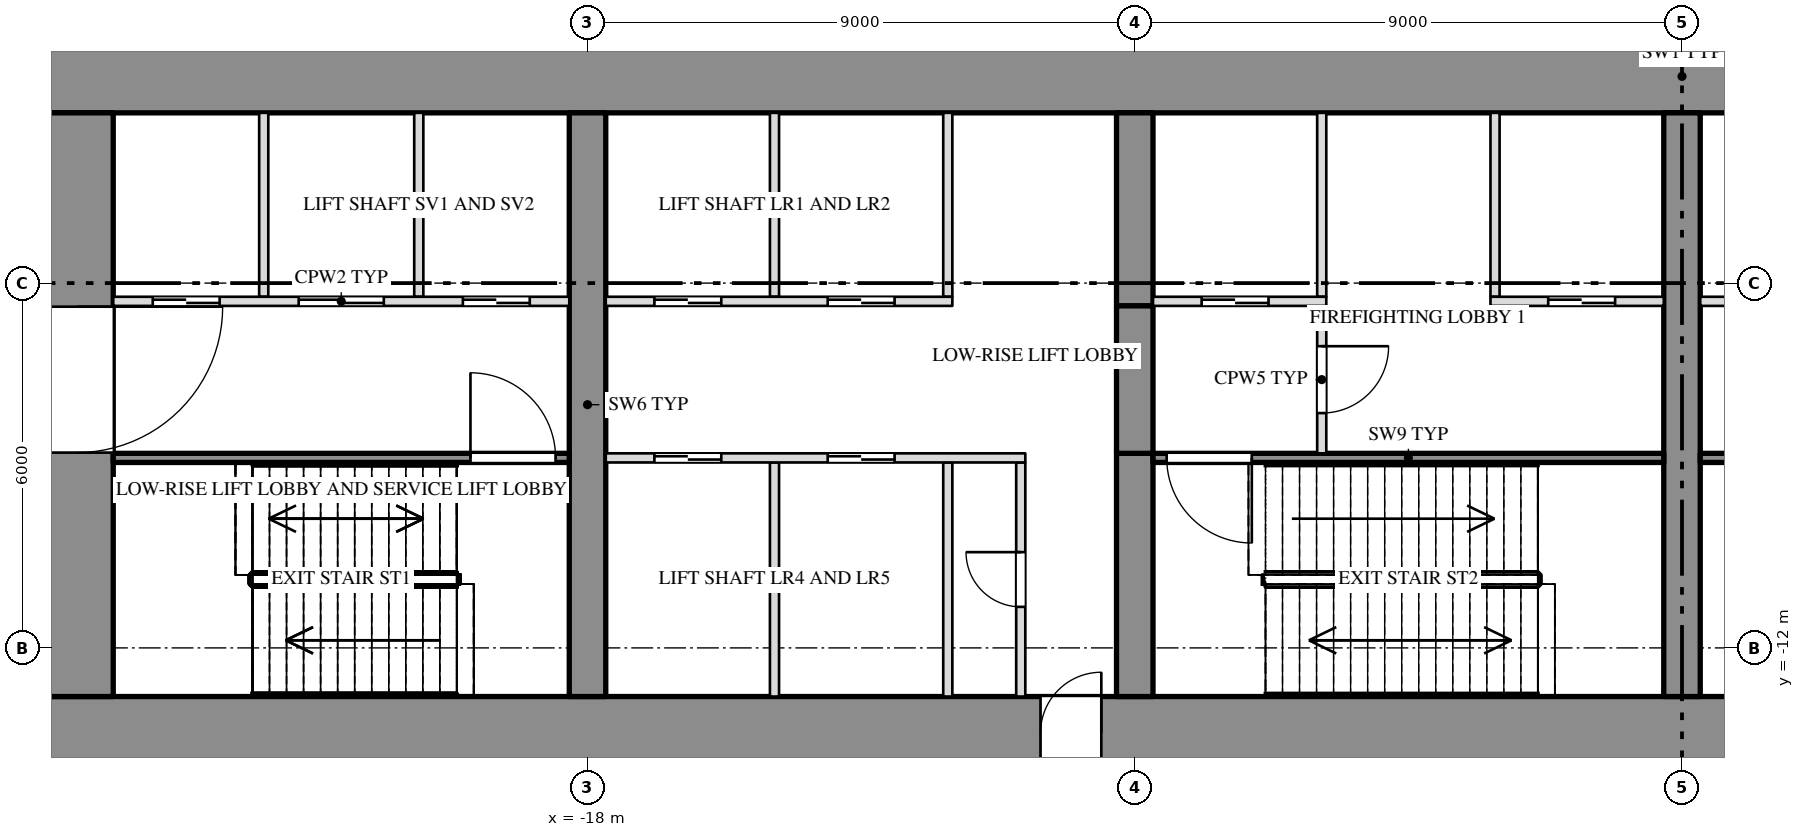
"""IFC4 building model, lengths in metres.
Left out: names, types, materials, properties, quantities, classifications, styles, units other than length and angle.
Written with IfcOpenShell. Run it as: python <this file> out.ifc"""

import sys

from ifc_helpers import new_model, si_unit, direction, frame, frame_2d, origin, place, context, subcontext, project, spatial, rectangle, extrude, element, fill, save


model = new_model("IFC4")
c1 = context("Model", 3, precision=1e-05, world=origin(), true_north=direction((0.0, 1.0)))
c2 = subcontext(c1, "Body", "Model", "MODEL_VIEW")
j1 = project(units=[si_unit("LENGTHUNIT", "METRE"), si_unit("PLANEANGLEUNIT", "RADIAN")], contexts=[c1])
p1 = place(None, origin())
s1 = spatial("IfcSite", under=j1, at=p1, CompositionType="ELEMENT")
p2 = place(p1, origin())
s2 = spatial("IfcBuilding", under=s1, at=p2, CompositionType="ELEMENT")
p3 = place(p2, frame((0.0, 0.0, 33.0)))
s3 = spatial("IfcBuildingStorey", under=s2, at=p3, CompositionType="ELEMENT", Elevation=33.0)
p4 = place(p3, frame((-27.0, -2.6, 0.0), z_axis=(0.0, 0.0, 1.0), x_axis=(1.0, 0.0, 0.0)))
e1 = element("IfcWall", 1, at=p4, inside=s3, PredefinedType="SHEAR", context=c2, shape_type="SweptSolid", body=[
    extrude(rectangle(XDim=54.0, YDim=1.2, at=frame_2d((27.0, 0.0))), origin(), (0.0, 0.0, 1.0), 5.75),
])
p5 = place(p3, frame((-27.0, -13.4, 0.0), z_axis=(0.0, 0.0, 1.0), x_axis=(1.0, 0.0, 0.0)))
e2 = element("IfcWall", 2, at=p5, inside=s3, PredefinedType="SHEAR", context=c2, shape_type="SweptSolid", body=[
    extrude(rectangle(XDim=54.0, YDim=1.2, at=frame_2d((27.0, 0.0))), origin(), (0.0, 0.0, 1.0), 5.75),
])
p6 = place(p5, frame((16.45, 0.0, 0.0)))
e3 = element("IfcOpeningElement", 3, at=p6, cuts=e2, PredefinedType="OPENING", context=c2, shape_type="SweptSolid", body=[
    extrude(rectangle(XDim=1.0, YDim=2.1, at=frame_2d((0.5, 1.05))), frame((0.0, 0.612, 0.0), z_axis=(0.0, -1.0, 0.0), x_axis=(1.0, 0.0, 0.0)), (0.0, 0.0, 1.0), 1.224),
])
p7 = place(p5, frame((36.55, 0.0, 0.0)))
e4 = element("IfcOpeningElement", 4, at=p7, cuts=e2, PredefinedType="OPENING", context=c2, shape_type="SweptSolid", body=[
    extrude(rectangle(XDim=1.0, YDim=2.1, at=frame_2d((0.5, 1.05))), frame((0.0, 0.612, 0.0), z_axis=(0.0, -1.0, 0.0), x_axis=(1.0, 0.0, 0.0)), (0.0, 0.0, 1.0), 1.224),
])
p8 = place(p3, frame((-26.4, -12.8, 0.0), z_axis=(0.0, 0.0, 1.0), x_axis=(0.0, 1.0, 0.0)))
e5 = element("IfcWall", 5, at=p8, inside=s3, PredefinedType="SHEAR", context=c2, shape_type="SweptSolid", body=[
    extrude(rectangle(XDim=9.6, YDim=1.2, at=frame_2d((4.8, 0.0))), origin(), (0.0, 0.0, 1.0), 5.75),
])
p9 = place(p8, frame((4.012, 0.0, 0.0)))
e6 = element("IfcOpeningElement", 6, at=p9, cuts=e5, PredefinedType="OPENING", context=c2, shape_type="SweptSolid", body=[
    extrude(rectangle(XDim=2.4, YDim=2.1, at=frame_2d((1.2, 1.05))), frame((0.0, 0.612, 0.0), z_axis=(0.0, -1.0, 0.0), x_axis=(1.0, 0.0, 0.0)), (0.0, 0.0, 1.0), 1.224),
])
p10 = place(p3, frame((-18.0, -12.8, 0.0), z_axis=(0.0, 0.0, 1.0), x_axis=(0.0, 1.0, 0.0)))
e7 = element("IfcWall", 7, at=p10, inside=s3, PredefinedType="SHEAR", context=c2, shape_type="SweptSolid", body=[
    extrude(rectangle(XDim=9.6, YDim=0.6, at=frame_2d((4.8, 0.0))), origin(), (0.0, 0.0, 1.0), 5.75),
])
p11 = place(p3, frame((-9.0, -12.8, 0.0), z_axis=(0.0, 0.0, 1.0), x_axis=(0.0, 1.0, 0.0)))
e8 = element("IfcWall", 8, at=p11, inside=s3, PredefinedType="SHEAR", context=c2, shape_type="SweptSolid", body=[
    extrude(rectangle(XDim=4.0, YDim=0.6, at=frame_2d((2.0, 0.0))), origin(), (0.0, 0.0, 1.0), 5.75),
])
p12 = place(p3, frame((-9.0, -6.375, 0.0), z_axis=(0.0, 0.0, 1.0), x_axis=(0.0, 1.0, 0.0)))
e9 = element("IfcWall", 9, at=p12, inside=s3, PredefinedType="SHEAR", context=c2, shape_type="SweptSolid", body=[
    extrude(rectangle(XDim=3.175, YDim=0.6, at=frame_2d((1.587, 0.0))), origin(), (0.0, 0.0, 1.0), 5.75),
])
p13 = place(p3, frame((-9.0, -8.8, 3.6), z_axis=(0.0, 0.0, 1.0), x_axis=(0.0, 1.0, 0.0)))
e10 = element("IfcWall", 10, at=p13, inside=s3, PredefinedType="SHEAR", context=c2, shape_type="SweptSolid", body=[
    extrude(rectangle(XDim=2.425, YDim=0.6, at=frame_2d((1.212, 0.0))), origin(), (0.0, 0.0, 1.0), 2.15),
])
p14 = place(p3, frame((0.0, -12.8, 0.0), z_axis=(0.0, 0.0, 1.0), x_axis=(0.0, 1.0, 0.0)))
e11 = element("IfcWall", 11, at=p14, inside=s3, PredefinedType="SHEAR", context=c2, shape_type="SweptSolid", body=[
    extrude(rectangle(XDim=9.6, YDim=0.6, at=frame_2d((4.8, 0.0))), origin(), (0.0, 0.0, 1.0), 5.75),
])
for number, where, z_axis, x_axis in (
    (12, (-20.775, -6.225, 0.0), (0.0, 0.0, 1.0), (0.0, 1.0, 0.0)),
    (13, (-23.325, -6.225, 0.0), (0.0, 0.0, 1.0), (0.0, 1.0, 0.0)),
    (14, (-12.075, -6.225, 0.0), (0.0, 0.0, 1.0), (0.0, 1.0, 0.0)),
    (15, (-14.925, -6.225, 0.0), (0.0, 0.0, 1.0), (0.0, 1.0, 0.0)),
    (16, (-3.075, -6.225, 0.0), (0.0, 0.0, 1.0), (0.0, 1.0, 0.0)),
    (17, (-5.925, -6.225, 0.0), (0.0, 0.0, 1.0), (0.0, 1.0, 0.0)),
):
    element("IfcWall", number, at=place(p3, frame(where, z_axis=z_axis, x_axis=x_axis)), inside=s3, PredefinedType="PARTITIONING", context=c2, shape_type="SweptSolid", body=[
        extrude(rectangle(XDim=3.025, YDim=0.15, at=frame_2d((1.513, 0.0))), origin(), (0.0, 0.0, 1.0), 5.75),
    ])
p15 = place(p3, frame((-10.875, -12.8, 0.0), z_axis=(0.0, 0.0, 1.0), x_axis=(0.0, 1.0, 0.0)))
e18 = element("IfcWall", 18, at=p15, inside=s3, PredefinedType="PARTITIONING", context=c2, shape_type="SweptSolid", body=[
    extrude(rectangle(XDim=3.85, YDim=0.15, at=frame_2d((1.925, 0.0))), origin(), (0.0, 0.0, 1.0), 5.75),
])
p16 = place(p15, frame((1.475, 0.0, 0.0)))
e19 = element("IfcOpeningElement", 19, at=p16, cuts=e18, PredefinedType="OPENING", context=c2, shape_type="SweptSolid", body=[
    extrude(rectangle(XDim=0.9, YDim=2.1, at=frame_2d((0.45, 1.05))), frame((0.0, 0.087, 0.0), z_axis=(0.0, -1.0, 0.0), x_axis=(1.0, 0.0, 0.0)), (0.0, 0.0, 1.0), 0.174),
])
for number, where, z_axis, x_axis in (
    (20, (-12.075, -12.8, 0.0), (0.0, 0.0, 1.0), (0.0, 1.0, 0.0)),
    (21, (-14.925, -12.8, 0.0), (0.0, 0.0, 1.0), (0.0, 1.0, 0.0)),
):
    element("IfcWall", number, at=place(p3, frame(where, z_axis=z_axis, x_axis=x_axis)), inside=s3, PredefinedType="PARTITIONING", context=c2, shape_type="SweptSolid", body=[
        extrude(rectangle(XDim=3.85, YDim=0.15, at=frame_2d((1.925, 0.0))), origin(), (0.0, 0.0, 1.0), 5.75),
    ])
p17 = place(p3, frame((-5.925, -8.8, 0.0), z_axis=(0.0, 0.0, 1.0), x_axis=(0.0, 1.0, 0.0)))
e22 = element("IfcWall", 22, at=p17, inside=s3, PredefinedType="PARTITIONING", context=c2, shape_type="SweptSolid", body=[
    extrude(rectangle(XDim=2.425, YDim=0.15, at=frame_2d((1.212, 0.0))), origin(), (0.0, 0.0, 1.0), 5.75),
])
p18 = place(p17, frame((0.662, 0.0, 0.0)))
e23 = element("IfcOpeningElement", 23, at=p18, cuts=e22, PredefinedType="OPENING", context=c2, shape_type="SweptSolid", body=[
    extrude(rectangle(XDim=1.1, YDim=2.1, at=frame_2d((0.55, 1.05))), frame((0.0, 0.087, 0.0), z_axis=(0.0, -1.0, 0.0), x_axis=(1.0, 0.0, 0.0)), (0.0, 0.0, 1.0), 0.174),
])
p19 = place(p3, frame((-25.8, -6.3, 0.0), z_axis=(0.0, 0.0, 1.0), x_axis=(1.0, 0.0, 0.0)))
e24 = element("IfcWall", 24, at=p19, inside=s3, PredefinedType="PARTITIONING", context=c2, shape_type="SweptSolid", body=[
    extrude(rectangle(XDim=7.5, YDim=0.15, at=frame_2d((3.75, 0.0))), origin(), (0.0, 0.0, 1.0), 5.75),
])
p20 = place(p19, frame((0.65, 0.0, 0.0)))
e25 = element("IfcOpeningElement", 25, at=p20, cuts=e24, PredefinedType="OPENING", context=c2, shape_type="SweptSolid", body=[
    extrude(rectangle(XDim=1.1, YDim=2.1, at=frame_2d((0.55, 1.05))), frame((0.0, 0.087, 0.0), z_axis=(0.0, -1.0, 0.0), x_axis=(1.0, 0.0, 0.0)), (0.0, 0.0, 1.0), 0.174),
])
p21 = place(p19, frame((3.05, 0.0, 0.0)))
e26 = element("IfcOpeningElement", 26, at=p21, cuts=e24, PredefinedType="OPENING", context=c2, shape_type="SweptSolid", body=[
    extrude(rectangle(XDim=1.4, YDim=2.1, at=frame_2d((0.7, 1.05))), frame((0.0, 0.087, 0.0), z_axis=(0.0, -1.0, 0.0), x_axis=(1.0, 0.0, 0.0)), (0.0, 0.0, 1.0), 0.174),
])
p22 = place(p19, frame((5.75, 0.0, 0.0)))
e27 = element("IfcOpeningElement", 27, at=p22, cuts=e24, PredefinedType="OPENING", context=c2, shape_type="SweptSolid", body=[
    extrude(rectangle(XDim=1.1, YDim=2.1, at=frame_2d((0.55, 1.05))), frame((0.0, 0.087, 0.0), z_axis=(0.0, -1.0, 0.0), x_axis=(1.0, 0.0, 0.0)), (0.0, 0.0, 1.0), 0.174),
])
p23 = place(p3, frame((-17.7, -6.3, 0.0), z_axis=(0.0, 0.0, 1.0), x_axis=(1.0, 0.0, 0.0)))
e28 = element("IfcWall", 28, at=p23, inside=s3, PredefinedType="PARTITIONING", context=c2, shape_type="SweptSolid", body=[
    extrude(rectangle(XDim=5.7, YDim=0.15, at=frame_2d((2.85, 0.0))), origin(), (0.0, 0.0, 1.0), 5.75),
])
p24 = place(p23, frame((0.8, 0.0, 0.0)))
e29 = element("IfcOpeningElement", 29, at=p24, cuts=e28, PredefinedType="OPENING", context=c2, shape_type="SweptSolid", body=[
    extrude(rectangle(XDim=1.1, YDim=2.1, at=frame_2d((0.55, 1.05))), frame((0.0, 0.087, 0.0), z_axis=(0.0, -1.0, 0.0), x_axis=(1.0, 0.0, 0.0)), (0.0, 0.0, 1.0), 0.174),
])
p25 = place(p23, frame((3.65, 0.0, 0.0)))
e30 = element("IfcOpeningElement", 30, at=p25, cuts=e28, PredefinedType="OPENING", context=c2, shape_type="SweptSolid", body=[
    extrude(rectangle(XDim=1.1, YDim=2.1, at=frame_2d((0.55, 1.05))), frame((0.0, 0.087, 0.0), z_axis=(0.0, -1.0, 0.0), x_axis=(1.0, 0.0, 0.0)), (0.0, 0.0, 1.0), 0.174),
])
p26 = place(p3, frame((-8.7, -6.3, 0.0), z_axis=(0.0, 0.0, 1.0), x_axis=(1.0, 0.0, 0.0)))
e31 = element("IfcWall", 31, at=p26, inside=s3, PredefinedType="PARTITIONING", context=c2, shape_type="SweptSolid", body=[
    extrude(rectangle(XDim=2.85, YDim=0.15, at=frame_2d((1.425, 0.0))), origin(), (0.0, 0.0, 1.0), 5.75),
])
p27 = place(p26, frame((0.8, 0.0, 0.0)))
e32 = element("IfcOpeningElement", 32, at=p27, cuts=e31, PredefinedType="OPENING", context=c2, shape_type="SweptSolid", body=[
    extrude(rectangle(XDim=1.1, YDim=2.1, at=frame_2d((0.55, 1.05))), frame((0.0, 0.087, 0.0), z_axis=(0.0, -1.0, 0.0), x_axis=(1.0, 0.0, 0.0)), (0.0, 0.0, 1.0), 0.174),
])
p28 = place(p3, frame((-3.15, -6.3, 0.0), z_axis=(0.0, 0.0, 1.0), x_axis=(1.0, 0.0, 0.0)))
e33 = element("IfcWall", 33, at=p28, inside=s3, PredefinedType="PARTITIONING", context=c2, shape_type="SweptSolid", body=[
    extrude(rectangle(XDim=2.85, YDim=0.15, at=frame_2d((1.425, 0.0))), origin(), (0.0, 0.0, 1.0), 5.75),
])
p29 = place(p28, frame((0.95, 0.0, 0.0)))
e34 = element("IfcOpeningElement", 34, at=p29, cuts=e33, PredefinedType="OPENING", context=c2, shape_type="SweptSolid", body=[
    extrude(rectangle(XDim=1.1, YDim=2.1, at=frame_2d((0.55, 1.05))), frame((0.0, 0.087, 0.0), z_axis=(0.0, -1.0, 0.0), x_axis=(1.0, 0.0, 0.0)), (0.0, 0.0, 1.0), 0.174),
])
p30 = place(p3, frame((0.3, -6.3, 0.0), z_axis=(0.0, 0.0, 1.0), x_axis=(1.0, 0.0, 0.0)))
e35 = element("IfcWall", 35, at=p30, inside=s3, PredefinedType="PARTITIONING", context=c2, shape_type="SweptSolid", body=[
    extrude(rectangle(XDim=2.85, YDim=0.15, at=frame_2d((1.425, 0.0))), origin(), (0.0, 0.0, 1.0), 5.75),
])
p31 = place(p30, frame((0.8, 0.0, 0.0)))
e36 = element("IfcOpeningElement", 36, at=p31, cuts=e35, PredefinedType="OPENING", context=c2, shape_type="SweptSolid", body=[
    extrude(rectangle(XDim=1.1, YDim=2.1, at=frame_2d((0.55, 1.05))), frame((0.0, 0.087, 0.0), z_axis=(0.0, -1.0, 0.0), x_axis=(1.0, 0.0, 0.0)), (0.0, 0.0, 1.0), 0.174),
])
p32 = place(p3, frame((-25.8, -8.875, 0.0), z_axis=(0.0, 0.0, 1.0), x_axis=(1.0, 0.0, 0.0)))
e37 = element("IfcWall", 37, at=p32, inside=s3, PredefinedType="SHEAR", context=c2, shape_type="SweptSolid", body=[
    extrude(rectangle(XDim=7.5, YDim=0.15, at=frame_2d((3.75, 0.0))), origin(), (0.0, 0.0, 1.0), 5.75),
])
p33 = place(p32, frame((5.875, 0.0, 0.0)))
e38 = element("IfcOpeningElement", 38, at=p33, cuts=e37, PredefinedType="OPENING", context=c2, shape_type="SweptSolid", body=[
    extrude(rectangle(XDim=1.4, YDim=2.1, at=frame_2d((0.7, 1.05))), frame((0.0, 0.087, 0.0), z_axis=(0.0, -1.0, 0.0), x_axis=(1.0, 0.0, 0.0)), (0.0, 0.0, 1.0), 0.174),
])
p34 = place(p3, frame((-17.7, -8.875, 0.0), z_axis=(0.0, 0.0, 1.0), x_axis=(1.0, 0.0, 0.0)))
e39 = element("IfcWall", 39, at=p34, inside=s3, PredefinedType="PARTITIONING", context=c2, shape_type="SweptSolid", body=[
    extrude(rectangle(XDim=6.9, YDim=0.15, at=frame_2d((3.45, 0.0))), origin(), (0.0, 0.0, 1.0), 5.75),
])
p35 = place(p34, frame((0.8, 0.0, 0.0)))
e40 = element("IfcOpeningElement", 40, at=p35, cuts=e39, PredefinedType="OPENING", context=c2, shape_type="SweptSolid", body=[
    extrude(rectangle(XDim=1.1, YDim=2.1, at=frame_2d((0.55, 1.05))), frame((0.0, 0.087, 0.0), z_axis=(0.0, -1.0, 0.0), x_axis=(1.0, 0.0, 0.0)), (0.0, 0.0, 1.0), 0.174),
])
p36 = place(p34, frame((3.65, 0.0, 0.0)))
e41 = element("IfcOpeningElement", 41, at=p36, cuts=e39, PredefinedType="OPENING", context=c2, shape_type="SweptSolid", body=[
    extrude(rectangle(XDim=1.1, YDim=2.1, at=frame_2d((0.55, 1.05))), frame((0.0, 0.087, 0.0), z_axis=(0.0, -1.0, 0.0), x_axis=(1.0, 0.0, 0.0)), (0.0, 0.0, 1.0), 0.174),
])
p37 = place(p3, frame((-8.7, -8.875, 0.0), z_axis=(0.0, 0.0, 1.0), x_axis=(1.0, 0.0, 0.0)))
e42 = element("IfcWall", 42, at=p37, inside=s3, PredefinedType="SHEAR", context=c2, shape_type="SweptSolid", body=[
    extrude(rectangle(XDim=8.4, YDim=0.15, at=frame_2d((4.2, 0.0))), origin(), (0.0, 0.0, 1.0), 5.75),
])
p38 = place(p37, frame((0.225, 0.0, 0.0)))
e43 = element("IfcOpeningElement", 43, at=p38, cuts=e42, PredefinedType="OPENING", context=c2, shape_type="SweptSolid", body=[
    extrude(rectangle(XDim=1.4, YDim=2.1, at=frame_2d((0.7, 1.05))), frame((0.0, 0.087, 0.0), z_axis=(0.0, -1.0, 0.0), x_axis=(1.0, 0.0, 0.0)), (0.0, 0.0, 1.0), 0.174),
])
p39 = place(p3, frame((0.3, -8.875, 0.0), z_axis=(0.0, 0.0, 1.0), x_axis=(1.0, 0.0, 0.0)))
e44 = element("IfcWall", 44, at=p39, inside=s3, PredefinedType="SHEAR", context=c2, shape_type="SweptSolid", body=[
    extrude(rectangle(XDim=8.4, YDim=0.15, at=frame_2d((4.2, 0.0))), origin(), (0.0, 0.0, 1.0), 5.75),
])
p40 = place(p39, frame((6.775, 0.0, 0.0)))
e45 = element("IfcOpeningElement", 45, at=p40, cuts=e44, PredefinedType="OPENING", context=c2, shape_type="SweptSolid", body=[
    extrude(rectangle(XDim=1.4, YDim=2.1, at=frame_2d((0.7, 1.05))), frame((0.0, 0.087, 0.0), z_axis=(0.0, -1.0, 0.0), x_axis=(1.0, 0.0, 0.0)), (0.0, 0.0, 1.0), 0.174),
])
p41 = place(p9, origin())
e46 = element("IfcDoor", 46, at=p41, inside=s3, OperationType="DOUBLE_DOOR_SINGLE_SWING", PredefinedType="DOOR", context=c2, shape_type="SweptSolid", body=[
    extrude(rectangle(XDim=2.4, YDim=2.1, at=frame_2d((1.2, 1.05))), frame((0.0, 0.025, 0.0), z_axis=(0.0, -1.0, 0.0), x_axis=(1.0, 0.0, 0.0)), (0.0, 0.0, 1.0), 0.05),
])
fill(e6, e46)
p42 = place(p20, origin())
e47 = element("IfcDoor", 47, at=p42, inside=s3, OperationType="SLIDING_TO_RIGHT", PredefinedType="DOOR", context=c2, shape_type="SweptSolid", body=[
    extrude(rectangle(XDim=1.1, YDim=2.1, at=frame_2d((0.55, 1.05))), frame((0.0, 0.025, 0.0), z_axis=(0.0, -1.0, 0.0), x_axis=(1.0, 0.0, 0.0)), (0.0, 0.0, 1.0), 0.05),
])
fill(e25, e47)
p43 = place(p21, origin())
e48 = element("IfcDoor", 48, at=p43, inside=s3, OperationType="SLIDING_TO_LEFT", PredefinedType="DOOR", context=c2, shape_type="SweptSolid", body=[
    extrude(rectangle(XDim=1.4, YDim=2.1, at=frame_2d((0.7, 1.05))), frame((0.0, 0.025, 0.0), z_axis=(0.0, -1.0, 0.0), x_axis=(1.0, 0.0, 0.0)), (0.0, 0.0, 1.0), 0.05),
])
fill(e26, e48)
p44 = place(p22, origin())
e49 = element("IfcDoor", 49, at=p44, inside=s3, OperationType="SLIDING_TO_RIGHT", PredefinedType="DOOR", context=c2, shape_type="SweptSolid", body=[
    extrude(rectangle(XDim=1.1, YDim=2.1, at=frame_2d((0.55, 1.05))), frame((0.0, 0.025, 0.0), z_axis=(0.0, -1.0, 0.0), x_axis=(1.0, 0.0, 0.0)), (0.0, 0.0, 1.0), 0.05),
])
fill(e27, e49)
p45 = place(p33, origin())
e50 = element("IfcDoor", 50, at=p45, inside=s3, OperationType="DOUBLE_DOOR_SINGLE_SWING", PredefinedType="DOOR", context=c2, shape_type="SweptSolid", body=[
    extrude(rectangle(XDim=1.4, YDim=2.1, at=frame_2d((0.7, 1.05))), frame((0.0, 0.025, 0.0), z_axis=(0.0, -1.0, 0.0), x_axis=(1.0, 0.0, 0.0)), (0.0, 0.0, 1.0), 0.05),
])
fill(e38, e50)
p46 = place(p35, origin())
e51 = element("IfcDoor", 51, at=p46, inside=s3, OperationType="SLIDING_TO_RIGHT", PredefinedType="DOOR", context=c2, shape_type="SweptSolid", body=[
    extrude(rectangle(XDim=1.1, YDim=2.1, at=frame_2d((0.55, 1.05))), frame((0.0, 0.025, 0.0), z_axis=(0.0, -1.0, 0.0), x_axis=(1.0, 0.0, 0.0)), (0.0, 0.0, 1.0), 0.05),
])
fill(e40, e51)
p47 = place(p24, origin())
e52 = element("IfcDoor", 52, at=p47, inside=s3, OperationType="SLIDING_TO_LEFT", PredefinedType="DOOR", context=c2, shape_type="SweptSolid", body=[
    extrude(rectangle(XDim=1.1, YDim=2.1, at=frame_2d((0.55, 1.05))), frame((0.0, 0.025, 0.0), z_axis=(0.0, -1.0, 0.0), x_axis=(1.0, 0.0, 0.0)), (0.0, 0.0, 1.0), 0.05),
])
fill(e29, e52)
p48 = place(p36, origin())
e53 = element("IfcDoor", 53, at=p48, inside=s3, OperationType="SLIDING_TO_RIGHT", PredefinedType="DOOR", context=c2, shape_type="SweptSolid", body=[
    extrude(rectangle(XDim=1.1, YDim=2.1, at=frame_2d((0.55, 1.05))), frame((0.0, 0.025, 0.0), z_axis=(0.0, -1.0, 0.0), x_axis=(1.0, 0.0, 0.0)), (0.0, 0.0, 1.0), 0.05),
])
fill(e41, e53)
p49 = place(p25, origin())
e54 = element("IfcDoor", 54, at=p49, inside=s3, OperationType="SLIDING_TO_LEFT", PredefinedType="DOOR", context=c2, shape_type="SweptSolid", body=[
    extrude(rectangle(XDim=1.1, YDim=2.1, at=frame_2d((0.55, 1.05))), frame((0.0, 0.025, 0.0), z_axis=(0.0, -1.0, 0.0), x_axis=(1.0, 0.0, 0.0)), (0.0, 0.0, 1.0), 0.05),
])
fill(e30, e54)
p50 = place(p16, origin())
e55 = element("IfcDoor", 55, at=p50, inside=s3, OperationType="SINGLE_SWING_RIGHT", PredefinedType="DOOR", context=c2, shape_type="SweptSolid", body=[
    extrude(rectangle(XDim=0.9, YDim=2.1, at=frame_2d((0.45, 1.05))), frame((0.0, 0.025, 0.0), z_axis=(0.0, -1.0, 0.0), x_axis=(1.0, 0.0, 0.0)), (0.0, 0.0, 1.0), 0.05),
])
fill(e19, e55)
p51 = place(p6, origin())
e56 = element("IfcDoor", 56, at=p51, inside=s3, OperationType="SINGLE_SWING_RIGHT", PredefinedType="DOOR", context=c2, shape_type="SweptSolid", body=[
    extrude(rectangle(XDim=1.0, YDim=2.1, at=frame_2d((0.5, 1.05))), frame((0.0, 0.025, 0.0), z_axis=(0.0, -1.0, 0.0), x_axis=(1.0, 0.0, 0.0)), (0.0, 0.0, 1.0), 0.05),
])
fill(e3, e56)
p52 = place(p38, origin())
e57 = element("IfcDoor", 57, at=p52, inside=s3, OperationType="DOUBLE_DOOR_SINGLE_SWING", PredefinedType="DOOR", context=c2, shape_type="SweptSolid", body=[
    extrude(rectangle(XDim=1.4, YDim=2.1, at=frame_2d((0.7, 1.05))), frame((0.0, 0.025, 0.0), z_axis=(0.0, -1.0, 0.0), x_axis=(1.0, 0.0, 0.0)), (0.0, 0.0, 1.0), 0.05),
])
fill(e43, e57)
p53 = place(p27, origin())
e58 = element("IfcDoor", 58, at=p53, inside=s3, OperationType="SLIDING_TO_LEFT", PredefinedType="DOOR", context=c2, shape_type="SweptSolid", body=[
    extrude(rectangle(XDim=1.1, YDim=2.1, at=frame_2d((0.55, 1.05))), frame((0.0, 0.025, 0.0), z_axis=(0.0, -1.0, 0.0), x_axis=(1.0, 0.0, 0.0)), (0.0, 0.0, 1.0), 0.05),
])
fill(e32, e58)
p54 = place(p18, origin())
e59 = element("IfcDoor", 59, at=p54, inside=s3, OperationType="SINGLE_SWING_LEFT", PredefinedType="DOOR", context=c2, shape_type="SweptSolid", body=[
    extrude(rectangle(XDim=1.1, YDim=2.1, at=frame_2d((0.55, 1.05))), frame((0.0, 0.025, 0.0), z_axis=(0.0, -1.0, 0.0), x_axis=(1.0, 0.0, 0.0)), (0.0, 0.0, 1.0), 0.05),
])
fill(e23, e59)
p55 = place(p29, origin())
e60 = element("IfcDoor", 60, at=p55, inside=s3, OperationType="SLIDING_TO_LEFT", PredefinedType="DOOR", context=c2, shape_type="SweptSolid", body=[
    extrude(rectangle(XDim=1.1, YDim=2.1, at=frame_2d((0.55, 1.05))), frame((0.0, 0.025, 0.0), z_axis=(0.0, -1.0, 0.0), x_axis=(1.0, 0.0, 0.0)), (0.0, 0.0, 1.0), 0.05),
])
fill(e34, e60)
save(model, sys.argv[1])
